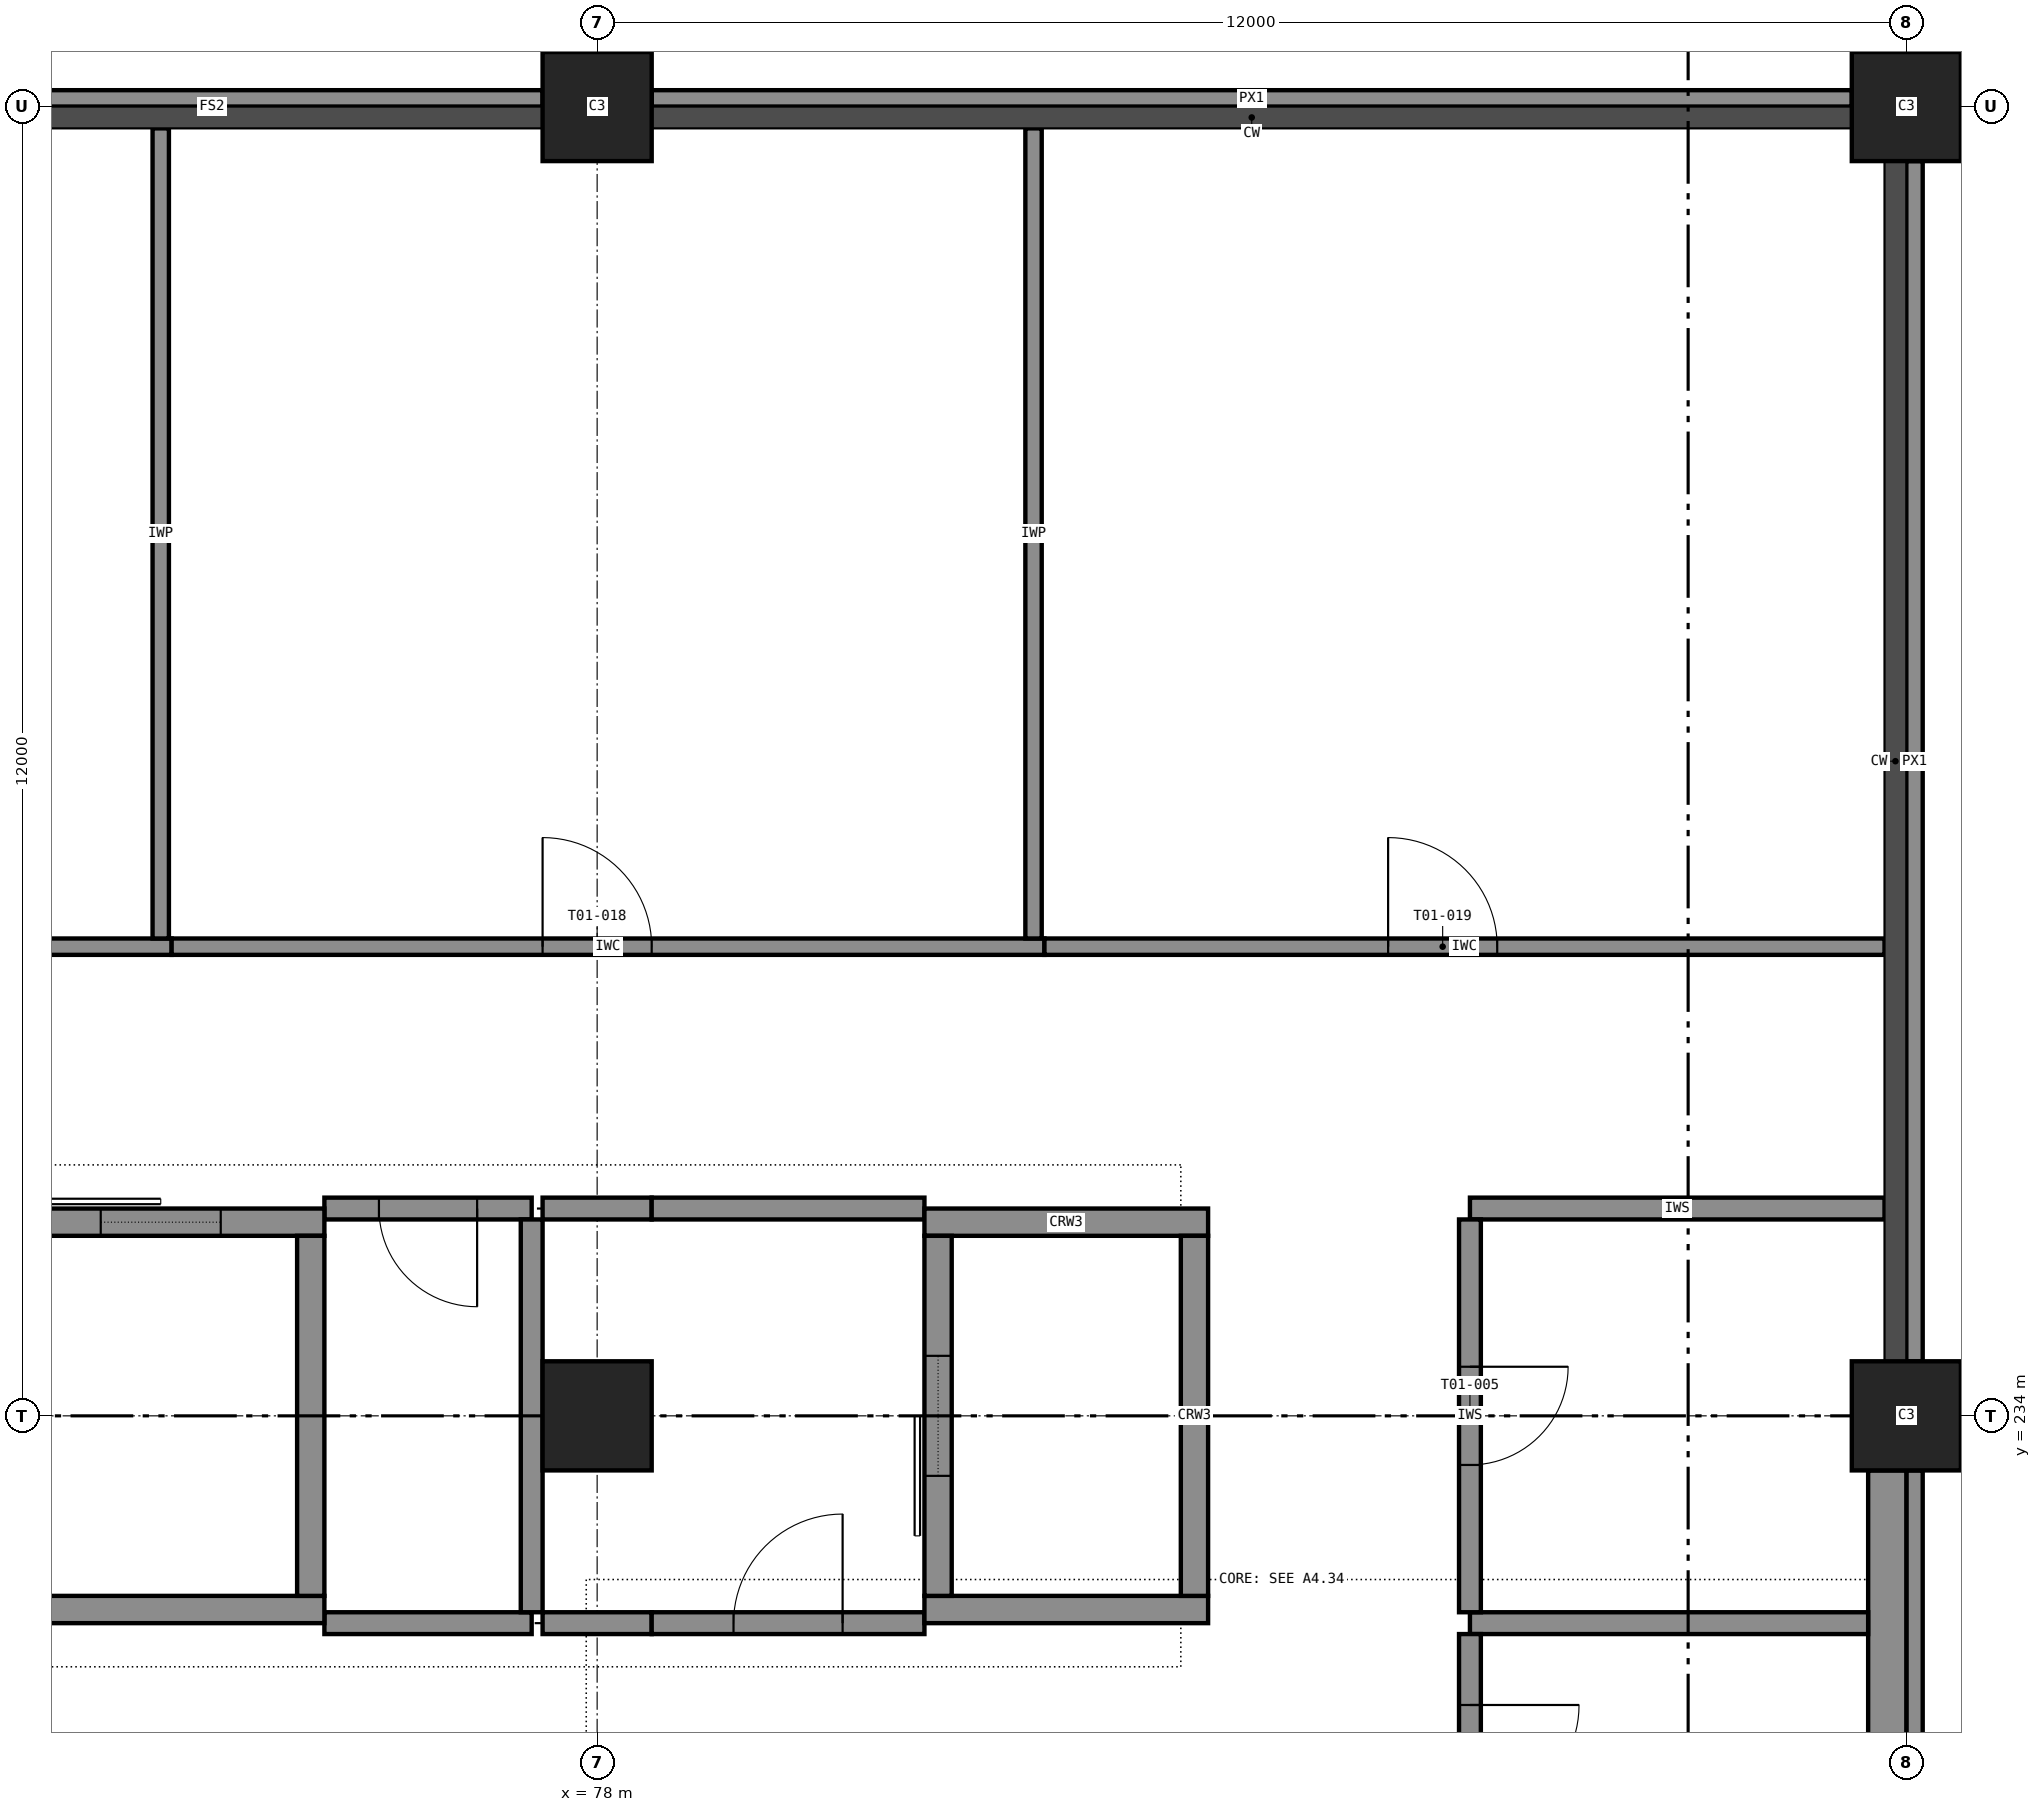
"""IFC4 building model, lengths in metres.
Left out: names, types, materials, properties, quantities, classifications, styles, units other than length and angle.
Written with IfcOpenShell. Run it as: python <this file> out.ifc"""

import sys

from ifc_helpers import new_model, si_unit, direction, frame, frame_2d, origin, origin_2d, place, context, subcontext, project, spatial, rectangle, extrude, element, fill, save


model = new_model("IFC4")
c1 = context("Model", 3, precision=1e-05, world=origin(), true_north=direction((0.0, 1.0)))
c2 = subcontext(c1, "Body", "Model", "MODEL_VIEW")
j1 = project(units=[si_unit("LENGTHUNIT", "METRE"), si_unit("PLANEANGLEUNIT", "RADIAN")], contexts=[c1])
p1 = place(None, origin())
s1 = spatial("IfcSite", under=j1, at=p1, CompositionType="ELEMENT")
p2 = place(p1, origin())
s2 = spatial("IfcBuilding", under=s1, at=p2, CompositionType="ELEMENT")
p3 = place(p2, frame((0.0, 0.0, 6.0)))
s3 = spatial("IfcBuildingStorey", under=s2, at=p3, CompositionType="ELEMENT", Elevation=6.0)
for number, where, z_axis, x_axis in (
    (1, (78.0, 234.0, 0.0), (0.0, 0.0, 1.0), (1.0, 0.0, 0.0)),
    (2, (78.0, 246.0, 0.0), (0.0, 0.0, 1.0), (1.0, 0.0, 0.0)),
    (3, (90.0, 234.0, 0.0), (0.0, 0.0, 1.0), (1.0, 0.0, 0.0)),
    (4, (90.0, 246.0, 0.0), (0.0, 0.0, 1.0), (1.0, 0.0, 0.0)),
):
    element("IfcColumn", number, at=place(p3, frame(where, z_axis=z_axis, x_axis=x_axis)), inside=s3, PredefinedType="COLUMN", context=c2, shape_type="SweptSolid", body=[
        extrude(rectangle(XDim=1.0, YDim=1.0, at=origin_2d()), origin(), (0.0, 0.0, 1.0), 6.0),
    ])
p4 = place(p3, frame((72.5, 232.225, 0.0), z_axis=(0.0, 0.0, 1.0), x_axis=(1.0, 0.0, 0.0)))
e5 = element("IfcWall", 5, at=p4, inside=s3, PredefinedType="SHEAR", context=c2, shape_type="SweptSolid", body=[
    extrude(rectangle(XDim=3.0, YDim=0.25, at=frame_2d((1.5, 0.0))), origin(), (0.0, 0.0, 1.0), 6.0),
])
p5 = place(p3, frame((72.5, 235.775, 0.0), z_axis=(0.0, 0.0, 1.0), x_axis=(1.0, 0.0, 0.0)))
e6 = element("IfcWall", 6, at=p5, inside=s3, PredefinedType="SHEAR", context=c2, shape_type="SweptSolid", body=[
    extrude(rectangle(XDim=3.0, YDim=0.25, at=frame_2d((1.5, 0.0))), origin(), (0.0, 0.0, 1.0), 6.0),
])
p6 = place(p5, frame((0.95, 0.0, 0.0)))
e7 = element("IfcOpeningElement", 7, at=p6, cuts=e6, PredefinedType="OPENING", context=c2, shape_type="SweptSolid", body=[
    extrude(rectangle(XDim=1.1, YDim=2.1, at=frame_2d((0.55, 1.05))), frame((0.0, 0.135, 0.0), z_axis=(0.0, -1.0, 0.0), x_axis=(1.0, 0.0, 0.0)), (0.0, 0.0, 1.0), 0.27),
])
p7 = place(p3, frame((75.375, 232.35, 0.0), z_axis=(0.0, 0.0, 1.0), x_axis=(0.0, 1.0, 0.0)))
e8 = element("IfcWall", 8, at=p7, inside=s3, PredefinedType="SHEAR", context=c2, shape_type="SweptSolid", body=[
    extrude(rectangle(XDim=3.3, YDim=0.25, at=frame_2d((1.65, 0.0))), origin(), (0.0, 0.0, 1.0), 6.0),
])
for number, where, z_axis, x_axis in (
    (9, (81.0, 232.225, 0.0), (0.0, 0.0, 1.0), (1.0, 0.0, 0.0)),
    (10, (81.0, 235.775, 0.0), (0.0, 0.0, 1.0), (1.0, 0.0, 0.0)),
):
    element("IfcWall", number, at=place(p3, frame(where, z_axis=z_axis, x_axis=x_axis)), inside=s3, PredefinedType="SHEAR", context=c2, shape_type="SweptSolid", body=[
        extrude(rectangle(XDim=2.6, YDim=0.25, at=frame_2d((1.3, 0.0))), origin(), (0.0, 0.0, 1.0), 6.0),
    ])
p8 = place(p3, frame((81.125, 232.35, 0.0), z_axis=(0.0, 0.0, 1.0), x_axis=(0.0, 1.0, 0.0)))
e11 = element("IfcWall", 11, at=p8, inside=s3, PredefinedType="SHEAR", context=c2, shape_type="SweptSolid", body=[
    extrude(rectangle(XDim=3.3, YDim=0.25, at=frame_2d((1.65, 0.0))), origin(), (0.0, 0.0, 1.0), 6.0),
])
p9 = place(p8, frame((1.1, 0.0, 0.0)))
e12 = element("IfcOpeningElement", 12, at=p9, cuts=e11, PredefinedType="OPENING", context=c2, shape_type="SweptSolid", body=[
    extrude(rectangle(XDim=1.1, YDim=2.1, at=frame_2d((0.55, 1.05))), frame((0.0, 0.135, 0.0), z_axis=(0.0, -1.0, 0.0), x_axis=(1.0, 0.0, 0.0)), (0.0, 0.0, 1.0), 0.27),
])
p10 = place(p3, frame((83.475, 232.35, 0.0), z_axis=(0.0, 0.0, 1.0), x_axis=(0.0, 1.0, 0.0)))
e13 = element("IfcWall", 13, at=p10, inside=s3, PredefinedType="SHEAR", context=c2, shape_type="SweptSolid", body=[
    extrude(rectangle(XDim=3.3, YDim=0.25, at=frame_2d((1.65, 0.0))), origin(), (0.0, 0.0, 1.0), 6.0),
])
p11 = place(p3, frame((89.825, 222.0, 0.0), z_axis=(0.0, 0.0, 1.0), x_axis=(0.0, 1.0, 0.0)))
e14 = element("IfcWall", 14, at=p11, inside=s3, PredefinedType="STANDARD", context=c2, shape_type="SweptSolid", body=[
    extrude(rectangle(XDim=11.5, YDim=0.35, at=frame_2d((5.75, 0.0))), origin(), (0.0, 0.0, 1.0), 4.75),
])
p12 = place(p11, frame((4.55, 0.0, 0.6)))
e15 = element("IfcOpeningElement", 15, at=p12, cuts=e14, PredefinedType="OPENING", context=c2, shape_type="SweptSolid", body=[
    extrude(rectangle(XDim=2.4, YDim=2.4, at=frame_2d((1.2, 1.2))), frame((0.0, 0.185, 0.0), z_axis=(0.0, -1.0, 0.0), x_axis=(1.0, 0.0, 0.0)), (0.0, 0.0, 1.0), 0.37),
])
p13 = place(p3, frame((90.075, 222.0, 5.75), z_axis=(0.0, 0.0, 1.0), x_axis=(0.0, 1.0, 0.0)))
e16 = element("IfcWall", 16, at=p13, inside=s3, PredefinedType="STANDARD", context=c2, shape_type="SweptSolid", body=[
    extrude(rectangle(XDim=11.5, YDim=0.15, at=frame_2d((5.75, 0.0))), origin(), (0.0, 0.0, 1.0), 0.25),
])
for number, where, z_axis, x_axis in (
    (17, (90.075, 234.5, 5.75), (0.0, 0.0, 1.0), (0.0, 1.0, 0.0)),
    (18, (89.5, 246.075, 5.75), (0.0, 0.0, 1.0), (-1.0, 0.0, 0.0)),
    (19, (77.5, 246.075, 5.75), (0.0, 0.0, 1.0), (-1.0, 0.0, 0.0)),
):
    element("IfcWall", number, at=place(p3, frame(where, z_axis=z_axis, x_axis=x_axis)), inside=s3, PredefinedType="STANDARD", context=c2, shape_type="SweptSolid", body=[
        extrude(rectangle(XDim=11.0, YDim=0.15, at=frame_2d((5.5, 0.0))), origin(), (0.0, 0.0, 1.0), 0.25),
    ])
p14 = place(p3, frame((75.5, 232.1, 0.0), z_axis=(0.0, 0.0, 1.0), x_axis=(1.0, 0.0, 0.0)))
e20 = element("IfcWall", 20, at=p14, inside=s3, PredefinedType="PARTITIONING", context=c2, shape_type="SweptSolid", body=[
    extrude(rectangle(XDim=1.9, YDim=0.2, at=frame_2d((0.95, 0.0))), origin(), (0.0, 0.0, 1.0), 5.75),
])
p15 = place(p3, frame((77.5, 232.1, 0.0), z_axis=(0.0, 0.0, 1.0), x_axis=(1.0, 0.0, 0.0)))
e21 = element("IfcWall", 21, at=p15, inside=s3, PredefinedType="PARTITIONING", context=c2, shape_type="SweptSolid", body=[
    extrude(rectangle(XDim=1.0, YDim=0.2, at=frame_2d((0.5, 0.0))), origin(), (0.0, 0.0, 1.0), 5.75),
])
p16 = place(p3, frame((78.5, 232.1, 0.0), z_axis=(0.0, 0.0, 1.0), x_axis=(1.0, 0.0, 0.0)))
e22 = element("IfcWall", 22, at=p16, inside=s3, PredefinedType="PARTITIONING", context=c2, shape_type="SweptSolid", body=[
    extrude(rectangle(XDim=2.5, YDim=0.2, at=frame_2d((1.25, 0.0))), origin(), (0.0, 0.0, 1.0), 5.75),
])
p17 = place(p16, frame((0.75, 0.0, 0.0)))
e23 = element("IfcOpeningElement", 23, at=p17, cuts=e22, PredefinedType="OPENING", context=c2, shape_type="SweptSolid", body=[
    extrude(rectangle(XDim=1.0, YDim=2.1, at=frame_2d((0.5, 1.05))), frame((0.0, 0.11, 0.0), z_axis=(0.0, -1.0, 0.0), x_axis=(1.0, 0.0, 0.0)), (0.0, 0.0, 1.0), 0.22),
])
p18 = place(p3, frame((86.0, 232.1, 0.0), z_axis=(0.0, 0.0, 1.0), x_axis=(1.0, 0.0, 0.0)))
e24 = element("IfcWall", 24, at=p18, inside=s3, PredefinedType="PARTITIONING", context=c2, shape_type="SweptSolid", body=[
    extrude(rectangle(XDim=3.65, YDim=0.2, at=frame_2d((1.825, 0.0))), origin(), (0.0, 0.0, 1.0), 5.75),
])
p19 = place(p3, frame((77.4, 235.9, 0.0), z_axis=(0.0, 0.0, 1.0), x_axis=(-1.0, 0.0, 0.0)))
e25 = element("IfcWall", 25, at=p19, inside=s3, PredefinedType="PARTITIONING", context=c2, shape_type="SweptSolid", body=[
    extrude(rectangle(XDim=1.9, YDim=0.2, at=frame_2d((0.95, 0.0))), origin(), (0.0, 0.0, 1.0), 5.75),
])
p20 = place(p19, frame((0.5, 0.0, 0.0)))
e26 = element("IfcOpeningElement", 26, at=p20, cuts=e25, PredefinedType="OPENING", context=c2, shape_type="SweptSolid", body=[
    extrude(rectangle(XDim=0.9, YDim=2.1, at=frame_2d((0.45, 1.05))), frame((0.0, 0.11, 0.0), z_axis=(0.0, -1.0, 0.0), x_axis=(1.0, 0.0, 0.0)), (0.0, 0.0, 1.0), 0.22),
])
p21 = place(p3, frame((77.5, 235.9, 0.0), z_axis=(0.0, 0.0, 1.0), x_axis=(1.0, 0.0, 0.0)))
e27 = element("IfcWall", 27, at=p21, inside=s3, PredefinedType="PARTITIONING", context=c2, shape_type="SweptSolid", body=[
    extrude(rectangle(XDim=1.0, YDim=0.2, at=frame_2d((0.5, 0.0))), origin(), (0.0, 0.0, 1.0), 5.75),
])
p22 = place(p3, frame((78.5, 235.9, 0.0), z_axis=(0.0, 0.0, 1.0), x_axis=(1.0, 0.0, 0.0)))
e28 = element("IfcWall", 28, at=p22, inside=s3, PredefinedType="PARTITIONING", context=c2, shape_type="SweptSolid", body=[
    extrude(rectangle(XDim=2.5, YDim=0.2, at=frame_2d((1.25, 0.0))), origin(), (0.0, 0.0, 1.0), 5.75),
])
p23 = place(p3, frame((86.0, 235.9, 0.0), z_axis=(0.0, 0.0, 1.0), x_axis=(1.0, 0.0, 0.0)))
e29 = element("IfcWall", 29, at=p23, inside=s3, PredefinedType="PARTITIONING", context=c2, shape_type="SweptSolid", body=[
    extrude(rectangle(XDim=3.8, YDim=0.2, at=frame_2d((1.9, 0.0))), origin(), (0.0, 0.0, 1.0), 5.75),
])
p24 = place(p3, frame((77.4, 232.2, 0.0), z_axis=(0.0, 0.0, 1.0), x_axis=(0.0, 1.0, 0.0)))
e30 = element("IfcWall", 30, at=p24, inside=s3, PredefinedType="PARTITIONING", context=c2, shape_type="SweptSolid", body=[
    extrude(rectangle(XDim=3.6, YDim=0.2, at=frame_2d((1.8, 0.0))), origin(), (0.0, 0.0, 1.0), 5.75),
])
p25 = place(p3, frame((86.0, 235.8, 0.0), z_axis=(0.0, 0.0, 1.0), x_axis=(0.0, -1.0, 0.0)))
e31 = element("IfcWall", 31, at=p25, inside=s3, PredefinedType="PARTITIONING", context=c2, shape_type="SweptSolid", body=[
    extrude(rectangle(XDim=3.6, YDim=0.2, at=frame_2d((1.8, 0.0))), origin(), (0.0, 0.0, 1.0), 5.75),
])
p26 = place(p25, frame((1.35, 0.0, 0.0)))
e32 = element("IfcOpeningElement", 32, at=p26, cuts=e31, PredefinedType="OPENING", context=c2, shape_type="SweptSolid", body=[
    extrude(rectangle(XDim=0.9, YDim=2.1, at=frame_2d((0.45, 1.05))), frame((0.0, 0.11, 0.0), z_axis=(0.0, -1.0, 0.0), x_axis=(1.0, 0.0, 0.0)), (0.0, 0.0, 1.0), 0.22),
])
p27 = place(p3, frame((86.0, 232.0, 0.0), z_axis=(0.0, 0.0, 1.0), x_axis=(0.0, -1.0, 0.0)))
e33 = element("IfcWall", 33, at=p27, inside=s3, PredefinedType="PARTITIONING", context=c2, shape_type="SweptSolid", body=[
    extrude(rectangle(XDim=2.3, YDim=0.2, at=frame_2d((1.15, 0.0))), origin(), (0.0, 0.0, 1.0), 5.75),
])
p28 = place(p27, frame((0.65, 0.0, 0.0)))
e34 = element("IfcOpeningElement", 34, at=p28, cuts=e33, PredefinedType="OPENING", context=c2, shape_type="SweptSolid", body=[
    extrude(rectangle(XDim=1.0, YDim=2.1, at=frame_2d((0.5, 1.05))), frame((0.0, 0.11, 0.0), z_axis=(0.0, -1.0, 0.0), x_axis=(1.0, 0.0, 0.0)), (0.0, 0.0, 1.0), 0.22),
])
p29 = place(p3, frame((62.1, 238.3, 0.0), z_axis=(0.0, 0.0, 1.0), x_axis=(1.0, 0.0, 0.0)))
e35 = element("IfcWall", 35, at=p29, inside=s3, PredefinedType="PARTITIONING", context=c2, shape_type="SweptSolid", body=[
    extrude(rectangle(XDim=12.0, YDim=0.15, at=frame_2d((6.0, 0.0))), origin(), (0.0, 0.0, 1.0), 5.75),
])
p30 = place(p29, frame((5.4, 0.0, 0.0)))
e36 = element("IfcOpeningElement", 36, at=p30, cuts=e35, PredefinedType="OPENING", context=c2, shape_type="SweptSolid", body=[
    extrude(rectangle(XDim=1.0, YDim=2.1, at=frame_2d((0.5, 1.05))), frame((0.0, 0.085, 0.0), z_axis=(0.0, -1.0, 0.0), x_axis=(1.0, 0.0, 0.0)), (0.0, 0.0, 1.0), 0.17),
])
p31 = place(p3, frame((74.1, 238.3, 0.0), z_axis=(0.0, 0.0, 1.0), x_axis=(1.0, 0.0, 0.0)))
e37 = element("IfcWall", 37, at=p31, inside=s3, PredefinedType="PARTITIONING", context=c2, shape_type="SweptSolid", body=[
    extrude(rectangle(XDim=8.0, YDim=0.15, at=frame_2d((4.0, 0.0))), origin(), (0.0, 0.0, 1.0), 5.75),
])
p32 = place(p31, frame((3.4, 0.0, 0.0)))
e38 = element("IfcOpeningElement", 38, at=p32, cuts=e37, PredefinedType="OPENING", context=c2, shape_type="SweptSolid", body=[
    extrude(rectangle(XDim=1.0, YDim=2.1, at=frame_2d((0.5, 1.05))), frame((0.0, 0.085, 0.0), z_axis=(0.0, -1.0, 0.0), x_axis=(1.0, 0.0, 0.0)), (0.0, 0.0, 1.0), 0.17),
])
p33 = place(p3, frame((74.0, 245.8, 0.0), z_axis=(0.0, 0.0, 1.0), x_axis=(0.0, -1.0, 0.0)))
e39 = element("IfcWall", 39, at=p33, inside=s3, PredefinedType="PARTITIONING", context=c2, shape_type="SweptSolid", body=[
    extrude(rectangle(XDim=7.425, YDim=0.15, at=frame_2d((3.712, 0.0))), origin(), (0.0, 0.0, 1.0), 5.75),
])
p34 = place(p3, frame((82.1, 238.3, 0.0), z_axis=(0.0, 0.0, 1.0), x_axis=(1.0, 0.0, 0.0)))
e40 = element("IfcWall", 40, at=p34, inside=s3, PredefinedType="PARTITIONING", context=c2, shape_type="SweptSolid", body=[
    extrude(rectangle(XDim=7.7, YDim=0.15, at=frame_2d((3.85, 0.0))), origin(), (0.0, 0.0, 1.0), 5.75),
])
p35 = place(p34, frame((3.15, 0.0, 0.0)))
e41 = element("IfcOpeningElement", 41, at=p35, cuts=e40, PredefinedType="OPENING", context=c2, shape_type="SweptSolid", body=[
    extrude(rectangle(XDim=1.0, YDim=2.1, at=frame_2d((0.5, 1.05))), frame((0.0, 0.085, 0.0), z_axis=(0.0, -1.0, 0.0), x_axis=(1.0, 0.0, 0.0)), (0.0, 0.0, 1.0), 0.17),
])
p36 = place(p3, frame((82.0, 245.8, 0.0), z_axis=(0.0, 0.0, 1.0), x_axis=(0.0, -1.0, 0.0)))
e42 = element("IfcWall", 42, at=p36, inside=s3, PredefinedType="PARTITIONING", context=c2, shape_type="SweptSolid", body=[
    extrude(rectangle(XDim=7.425, YDim=0.15, at=frame_2d((3.712, 0.0))), origin(), (0.0, 0.0, 1.0), 5.75),
])
p37 = place(p20, origin())
e43 = element("IfcDoor", 43, at=p37, inside=s3, OperationType="SINGLE_SWING_LEFT", PredefinedType="DOOR", context=c2, shape_type="SweptSolid", body=[
    extrude(rectangle(XDim=0.9, YDim=2.1, at=frame_2d((0.45, 1.05))), frame((0.0, 0.025, 0.0), z_axis=(0.0, -1.0, 0.0), x_axis=(1.0, 0.0, 0.0)), (0.0, 0.0, 1.0), 0.05),
])
fill(e26, e43)
p38 = place(p17, origin())
e44 = element("IfcDoor", 44, at=p38, inside=s3, OperationType="SINGLE_SWING_RIGHT", PredefinedType="DOOR", context=c2, shape_type="SweptSolid", body=[
    extrude(rectangle(XDim=1.0, YDim=2.1, at=frame_2d((0.5, 1.05))), frame((0.0, 0.025, 0.0), z_axis=(0.0, -1.0, 0.0), x_axis=(1.0, 0.0, 0.0)), (0.0, 0.0, 1.0), 0.05),
])
fill(e23, e44)
p39 = place(p26, origin())
e45 = element("IfcDoor", 45, at=p39, inside=s3, OperationType="SINGLE_SWING_LEFT", PredefinedType="DOOR", context=c2, shape_type="SweptSolid", body=[
    extrude(rectangle(XDim=0.9, YDim=2.1, at=frame_2d((0.45, 1.05))), frame((0.0, 0.025, 0.0), z_axis=(0.0, -1.0, 0.0), x_axis=(1.0, 0.0, 0.0)), (0.0, 0.0, 1.0), 0.05),
])
fill(e32, e45)
p40 = place(p28, origin())
e46 = element("IfcDoor", 46, at=p40, inside=s3, OperationType="SINGLE_SWING_LEFT", PredefinedType="DOOR", context=c2, shape_type="SweptSolid", body=[
    extrude(rectangle(XDim=1.0, YDim=2.1, at=frame_2d((0.5, 1.05))), frame((0.0, 0.025, 0.0), z_axis=(0.0, -1.0, 0.0), x_axis=(1.0, 0.0, 0.0)), (0.0, 0.0, 1.0), 0.05),
])
fill(e34, e46)
p41 = place(p32, origin())
e47 = element("IfcDoor", 47, at=p41, inside=s3, OperationType="SINGLE_SWING_LEFT", PredefinedType="DOOR", context=c2, shape_type="SweptSolid", body=[
    extrude(rectangle(XDim=1.0, YDim=2.1, at=frame_2d((0.5, 1.05))), frame((0.0, 0.025, 0.0), z_axis=(0.0, -1.0, 0.0), x_axis=(1.0, 0.0, 0.0)), (0.0, 0.0, 1.0), 0.05),
])
fill(e38, e47)
p42 = place(p35, origin())
e48 = element("IfcDoor", 48, at=p42, inside=s3, OperationType="SINGLE_SWING_LEFT", PredefinedType="DOOR", context=c2, shape_type="SweptSolid", body=[
    extrude(rectangle(XDim=1.0, YDim=2.1, at=frame_2d((0.5, 1.05))), frame((0.0, 0.025, 0.0), z_axis=(0.0, -1.0, 0.0), x_axis=(1.0, 0.0, 0.0)), (0.0, 0.0, 1.0), 0.05),
])
fill(e41, e48)
p43 = place(p6, origin())
e49 = element("IfcDoor", 49, at=p43, inside=s3, OperationType="SLIDING_TO_LEFT", PredefinedType="DOOR", context=c2, shape_type="SweptSolid", body=[
    extrude(rectangle(XDim=1.1, YDim=2.1, at=frame_2d((0.55, 1.05))), frame((0.0, 0.025, 0.0), z_axis=(0.0, -1.0, 0.0), x_axis=(1.0, 0.0, 0.0)), (0.0, 0.0, 1.0), 0.05),
])
fill(e7, e49)
p44 = place(p9, origin())
e50 = element("IfcDoor", 50, at=p44, inside=s3, OperationType="SLIDING_TO_LEFT", PredefinedType="DOOR", context=c2, shape_type="SweptSolid", body=[
    extrude(rectangle(XDim=1.1, YDim=2.1, at=frame_2d((0.55, 1.05))), frame((0.0, 0.025, 0.0), z_axis=(0.0, -1.0, 0.0), x_axis=(1.0, 0.0, 0.0)), (0.0, 0.0, 1.0), 0.05),
])
fill(e12, e50)
save(model, sys.argv[1])
